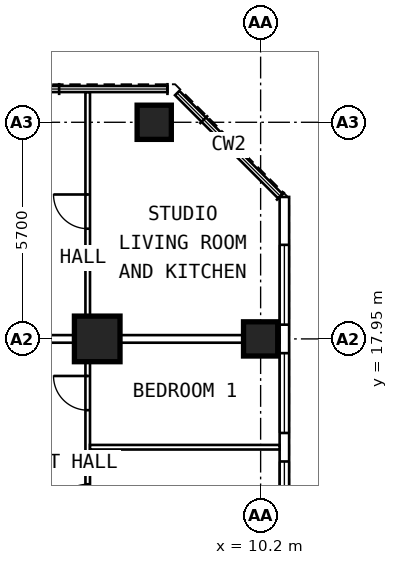
"""IFC4 building model, lengths in metres.
Left out: names, types, materials, properties, quantities, classifications, styles, units other than length and angle.
Written with IfcOpenShell. Run it as: python <this file> out.ifc"""

import sys

from ifc_helpers import new_model, si_unit, direction, frame, frame_2d, origin, origin_2d, place, context, subcontext, project, spatial, rectangle, extrude, element, fill, save


model = new_model("IFC4")
c1 = context("Model", 3, precision=1e-05, world=origin(), true_north=direction((0.0, 1.0)))
c2 = subcontext(c1, "Body", "Model", "MODEL_VIEW")
j1 = project(units=[si_unit("LENGTHUNIT", "METRE"), si_unit("PLANEANGLEUNIT", "RADIAN")], contexts=[c1])
p1 = place(None, origin())
s1 = spatial("IfcSite", under=j1, at=p1, CompositionType="ELEMENT")
p2 = place(p1, origin())
s2 = spatial("IfcBuilding", under=s1, at=p2, CompositionType="ELEMENT")
p3 = place(p2, frame((0.0, 0.0, 161.6)))
s3 = spatial("IfcBuildingStorey", under=s2, at=p3, CompositionType="ELEMENT", Elevation=161.6)
for number, where, z_axis, x_axis in (
    (1, (10.2, 17.95, 0.0), (0.0, 0.0, 1.0), (0.0, 1.0, 0.0)),
    (2, (7.4, 23.65, 0.0), (0.0, 0.0, 1.0), (0.0, 1.0, 0.0)),
):
    element("IfcColumn", number, at=place(p3, frame(where, z_axis=z_axis, x_axis=x_axis)), inside=s3, PredefinedType="COLUMN", context=c2, shape_type="SweptSolid", body=[
        extrude(rectangle(XDim=0.9, YDim=0.9, at=origin_2d()), origin(), (0.0, 0.0, 1.0), 3.6),
    ])
p4 = place(p3, frame((5.9, 17.95, 0.0), z_axis=(0.0, 0.0, 1.0), x_axis=(0.0, 1.0, 0.0)))
e3 = element("IfcColumn", 3, at=p4, inside=s3, PredefinedType="COLUMN", context=c2, shape_type="SweptSolid", body=[
    extrude(rectangle(XDim=1.2, YDim=1.2, at=origin_2d()), origin(), (0.0, 0.0, 1.0), 3.6),
])
p5 = place(p3, frame((10.825, 6.409, 0.0), z_axis=(0.0, 0.0, 1.0), x_axis=(0.0, 1.0, 0.0)))
e4 = element("IfcWall", 4, at=p5, inside=s3, PredefinedType="SOLIDWALL", context=c2, shape_type="SweptSolid", body=[
    extrude(rectangle(XDim=15.276, YDim=0.25, at=frame_2d((7.638, 0.0))), origin(), (0.0, 0.0, 1.0), 3.35),
])
p6 = place(p5, frame((0.516, 0.0, 0.8)))
e5 = element("IfcOpeningElement", 5, at=p6, cuts=e4, PredefinedType="OPENING", context=c2, shape_type="SweptSolid", body=[
    extrude(rectangle(XDim=2.1, YDim=1.8, at=frame_2d((1.05, 0.9))), frame((0.0, 0.137, 0.0), z_axis=(0.0, -1.0, 0.0), x_axis=(1.0, 0.0, 0.0)), (0.0, 0.0, 1.0), 0.274),
])
p7 = place(p5, frame((3.366, 0.0, 0.8)))
e6 = element("IfcOpeningElement", 6, at=p7, cuts=e4, PredefinedType="OPENING", context=c2, shape_type="SweptSolid", body=[
    extrude(rectangle(XDim=2.1, YDim=1.8, at=frame_2d((1.05, 0.9))), frame((0.0, 0.137, 0.0), z_axis=(0.0, -1.0, 0.0), x_axis=(1.0, 0.0, 0.0)), (0.0, 0.0, 1.0), 0.274),
])
p8 = place(p5, frame((6.216, 0.0, 0.8)))
e7 = element("IfcOpeningElement", 7, at=p8, cuts=e4, PredefinedType="OPENING", context=c2, shape_type="SweptSolid", body=[
    extrude(rectangle(XDim=2.1, YDim=1.8, at=frame_2d((1.05, 0.9))), frame((0.0, 0.137, 0.0), z_axis=(0.0, -1.0, 0.0), x_axis=(1.0, 0.0, 0.0)), (0.0, 0.0, 1.0), 0.274),
])
p9 = place(p5, frame((9.066, 0.0, 0.8)))
e8 = element("IfcOpeningElement", 8, at=p9, cuts=e4, PredefinedType="OPENING", context=c2, shape_type="SweptSolid", body=[
    extrude(rectangle(XDim=2.1, YDim=1.8, at=frame_2d((1.05, 0.9))), frame((0.0, 0.137, 0.0), z_axis=(0.0, -1.0, 0.0), x_axis=(1.0, 0.0, 0.0)), (0.0, 0.0, 1.0), 0.274),
])
p10 = place(p5, frame((11.916, 0.0, 0.8)))
e9 = element("IfcOpeningElement", 9, at=p10, cuts=e4, PredefinedType="OPENING", context=c2, shape_type="SweptSolid", body=[
    extrude(rectangle(XDim=2.1, YDim=1.8, at=frame_2d((1.05, 0.9))), frame((0.0, 0.137, 0.0), z_axis=(0.0, -1.0, 0.0), x_axis=(1.0, 0.0, 0.0)), (0.0, 0.0, 1.0), 0.274),
])
p11 = place(p3, frame((5.65, 9.6, 0.0), z_axis=(0.0, 0.0, 1.0), x_axis=(0.0, 1.0, 0.0)))
e10 = element("IfcWall", 10, at=p11, inside=s3, PredefinedType="PARTITIONING", context=c2, shape_type="SweptSolid", body=[
    extrude(rectangle(XDim=8.1, YDim=0.12, at=frame_2d((4.05, 0.0))), origin(), (0.0, 0.0, 1.0), 3.35),
])
p12 = place(p11, frame((1.0, 0.0, 0.0)))
e11 = element("IfcOpeningElement", 11, at=p12, cuts=e10, PredefinedType="OPENING", context=c2, shape_type="SweptSolid", body=[
    extrude(rectangle(XDim=0.9, YDim=2.1, at=frame_2d((0.45, 1.05))), frame((0.0, 0.072, 0.0), z_axis=(0.0, -1.0, 0.0), x_axis=(1.0, 0.0, 0.0)), (0.0, 0.0, 1.0), 0.144),
])
p13 = place(p11, frame((3.625, 0.0, 0.0)))
e12 = element("IfcOpeningElement", 12, at=p13, cuts=e10, PredefinedType="OPENING", context=c2, shape_type="SweptSolid", body=[
    extrude(rectangle(XDim=0.9, YDim=2.1, at=frame_2d((0.45, 1.05))), frame((0.0, 0.072, 0.0), z_axis=(0.0, -1.0, 0.0), x_axis=(1.0, 0.0, 0.0)), (0.0, 0.0, 1.0), 0.144),
])
p14 = place(p11, frame((6.475, 0.0, 0.0)))
e13 = element("IfcOpeningElement", 13, at=p14, cuts=e10, PredefinedType="OPENING", context=c2, shape_type="SweptSolid", body=[
    extrude(rectangle(XDim=0.9, YDim=2.1, at=frame_2d((0.45, 1.05))), frame((0.0, 0.072, 0.0), z_axis=(0.0, -1.0, 0.0), x_axis=(1.0, 0.0, 0.0)), (0.0, 0.0, 1.0), 0.144),
])
p15 = place(p3, frame((5.71, 15.1, 0.0), z_axis=(0.0, 0.0, 1.0), x_axis=(1.0, 0.0, 0.0)))
e14 = element("IfcWall", 14, at=p15, inside=s3, PredefinedType="PARTITIONING", context=c2, shape_type="SweptSolid", body=[
    extrude(rectangle(XDim=4.99, YDim=0.12, at=frame_2d((2.495, 0.0))), origin(), (0.0, 0.0, 1.0), 3.35),
])
p16 = place(p3, frame((5.65, 18.05, 0.0), z_axis=(0.0, 0.0, 1.0), x_axis=(0.0, 1.0, 0.0)))
e15 = element("IfcWall", 15, at=p16, inside=s3, PredefinedType="PARTITIONING", context=c2, shape_type="SweptSolid", body=[
    extrude(rectangle(XDim=6.395, YDim=0.12, at=frame_2d((3.198, 0.0))), origin(), (0.0, 0.0, 1.0), 3.35),
])
p17 = place(p16, frame((2.8, 0.0, 0.0)))
e16 = element("IfcOpeningElement", 16, at=p17, cuts=e15, PredefinedType="OPENING", context=c2, shape_type="SweptSolid", body=[
    extrude(rectangle(XDim=0.9, YDim=2.1, at=frame_2d((0.45, 1.05))), frame((0.0, 0.072, 0.0), z_axis=(0.0, -1.0, 0.0), x_axis=(1.0, 0.0, 0.0)), (0.0, 0.0, 1.0), 0.144),
])
p18 = place(p3, frame((2.0, 17.95, 0.0), z_axis=(0.0, 0.0, 1.0), x_axis=(1.0, 0.0, 0.0)))
e17 = element("IfcWall", 17, at=p18, inside=s3, PredefinedType="PARTITIONING", context=c2, shape_type="SweptSolid", body=[
    extrude(rectangle(XDim=8.7, YDim=0.2, at=frame_2d((4.35, 0.0))), origin(), (0.0, 0.0, 1.0), 2.45),
])
p19 = place(p8, origin())
e18 = element("IfcWindow", 18, at=p19, inside=s3, PartitioningType="SINGLE_PANEL", PredefinedType="WINDOW", context=c2, shape_type="SweptSolid", body=[
    extrude(rectangle(XDim=2.1, YDim=1.8, at=frame_2d((1.05, 0.9))), frame((0.0, 0.03, 0.0), z_axis=(0.0, -1.0, 0.0), x_axis=(1.0, 0.0, 0.0)), (0.0, 0.0, 1.0), 0.06),
])
fill(e7, e18)
p20 = place(p9, origin())
e19 = element("IfcWindow", 19, at=p20, inside=s3, PartitioningType="SINGLE_PANEL", PredefinedType="WINDOW", context=c2, shape_type="SweptSolid", body=[
    extrude(rectangle(XDim=2.1, YDim=1.8, at=frame_2d((1.05, 0.9))), frame((0.0, 0.03, 0.0), z_axis=(0.0, -1.0, 0.0), x_axis=(1.0, 0.0, 0.0)), (0.0, 0.0, 1.0), 0.06),
])
fill(e8, e19)
p21 = place(p10, origin())
e20 = element("IfcWindow", 20, at=p21, inside=s3, PartitioningType="SINGLE_PANEL", PredefinedType="WINDOW", context=c2, shape_type="SweptSolid", body=[
    extrude(rectangle(XDim=2.1, YDim=1.8, at=frame_2d((1.05, 0.9))), frame((0.0, 0.03, 0.0), z_axis=(0.0, -1.0, 0.0), x_axis=(1.0, 0.0, 0.0)), (0.0, 0.0, 1.0), 0.06),
])
fill(e9, e20)
p22 = place(p13, origin())
e21 = element("IfcDoor", 21, at=p22, inside=s3, OperationType="SINGLE_SWING_LEFT", PredefinedType="DOOR", context=c2, shape_type="SweptSolid", body=[
    extrude(rectangle(XDim=0.9, YDim=2.1, at=frame_2d((0.45, 1.05))), frame((0.0, 0.025, 0.0), z_axis=(0.0, -1.0, 0.0), x_axis=(1.0, 0.0, 0.0)), (0.0, 0.0, 1.0), 0.05),
])
fill(e12, e21)
p23 = place(p14, origin())
e22 = element("IfcDoor", 22, at=p23, inside=s3, OperationType="SINGLE_SWING_RIGHT", PredefinedType="DOOR", context=c2, shape_type="SweptSolid", body=[
    extrude(rectangle(XDim=0.9, YDim=2.1, at=frame_2d((0.45, 1.05))), frame((0.0, 0.025, 0.0), z_axis=(0.0, -1.0, 0.0), x_axis=(1.0, 0.0, 0.0)), (0.0, 0.0, 1.0), 0.05),
])
fill(e13, e22)
p24 = place(p17, origin())
e23 = element("IfcDoor", 23, at=p24, inside=s3, OperationType="SINGLE_SWING_RIGHT", PredefinedType="DOOR", context=c2, shape_type="SweptSolid", body=[
    extrude(rectangle(XDim=0.9, YDim=2.1, at=frame_2d((0.45, 1.05))), frame((0.0, 0.025, 0.0), z_axis=(0.0, -1.0, 0.0), x_axis=(1.0, 0.0, 0.0)), (0.0, 0.0, 1.0), 0.05),
])
fill(e16, e23)
save(model, sys.argv[1])
